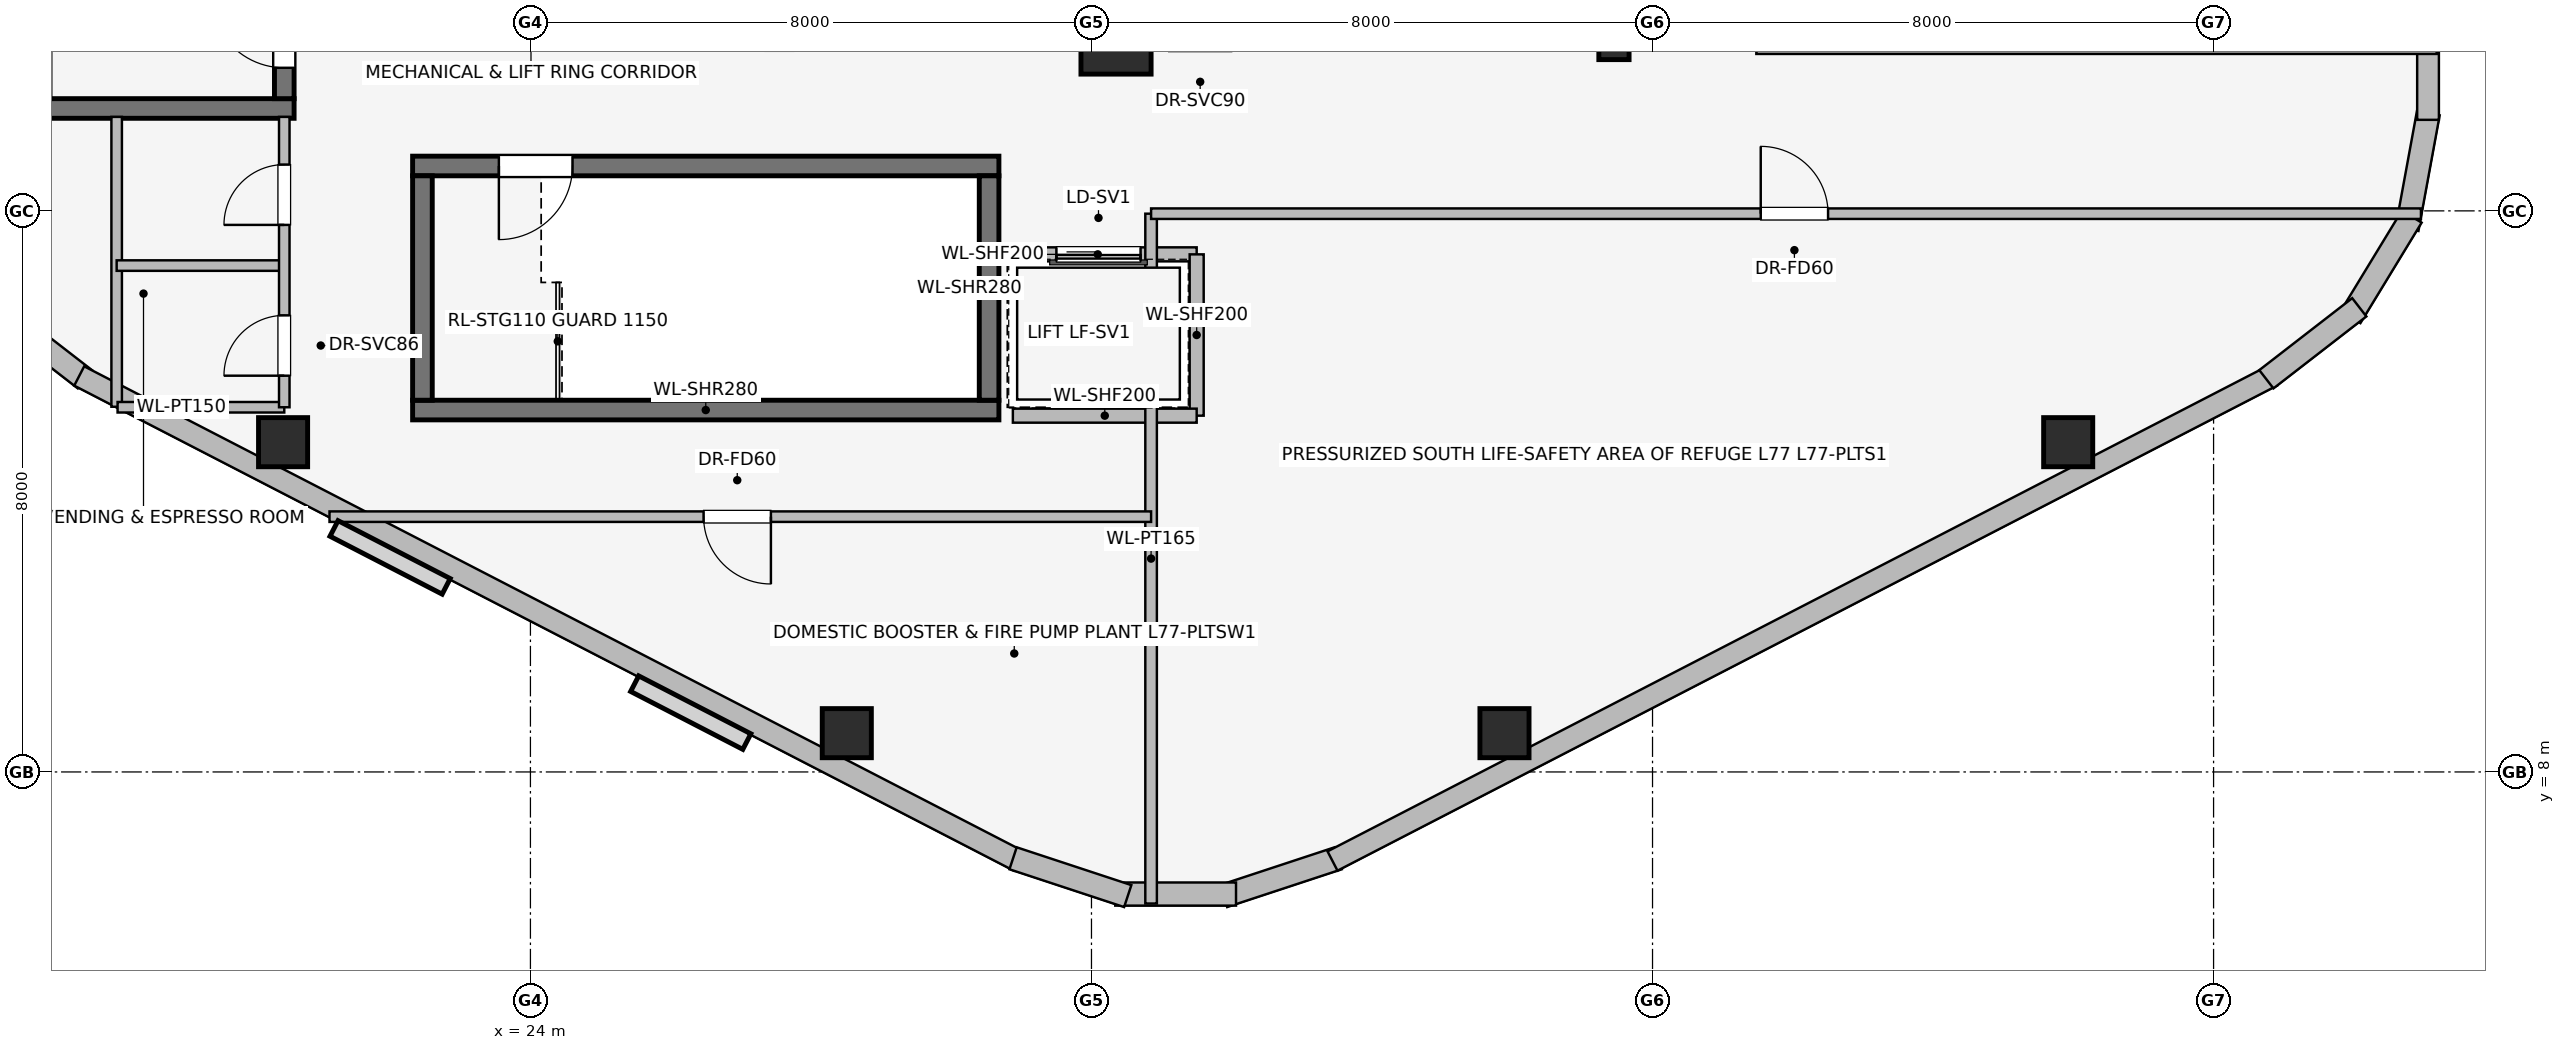
"""IFC4 building model, lengths in metres.
Left out: names, types, materials, properties, quantities, classifications, styles, units other than length and angle.
Written with IfcOpenShell. Run it as: python <this file> out.ifc"""

import sys

from ifc_helpers import new_model, si_unit, direction, frame, frame_2d, origin, origin_2d, place, context, subcontext, project, spatial, rectangle, i_section, extrude, element, fill, save


model = new_model("IFC4")
c1 = context("Model", 3, precision=1e-05, world=origin(), true_north=direction((0.0, 1.0)))
c2 = subcontext(c1, "Body", "Model", "MODEL_VIEW")
j1 = project(units=[si_unit("LENGTHUNIT", "METRE"), si_unit("PLANEANGLEUNIT", "RADIAN")], contexts=[c1])
p1 = place(None, origin())
s1 = spatial("IfcSite", under=j1, at=p1, CompositionType="ELEMENT")
p2 = place(p1, origin())
s2 = spatial("IfcBuilding", under=s1, at=p2, CompositionType="ELEMENT")
p3 = place(p2, frame((0.0, 0.0, 285.1)))
s3 = spatial("IfcBuildingStorey", under=s2, at=p3, CompositionType="ELEMENT", Elevation=285.1)
p4 = place(p3, frame((16.87, 17.46, 0.0), z_axis=(0.0, 0.0, 1.0), x_axis=(1.0, 0.0, 0.0)))
e1 = element("IfcWall", 1, at=p4, inside=s3, PredefinedType="SHEAR", context=c2, shape_type="SweptSolid", body=[
    extrude(rectangle(XDim=3.76, YDim=0.28, at=frame_2d((1.88, 0.0))), origin(), (0.0, 0.0, 1.0), 6.2),
])
p5 = place(p3, frame((20.49, 17.6, 0.0), z_axis=(0.0, 0.0, 1.0), x_axis=(0.0, 1.0, 0.0)))
e2 = element("IfcWall", 2, at=p5, inside=s3, PredefinedType="SHEAR", context=c2, shape_type="SweptSolid", body=[
    extrude(rectangle(XDim=7.8, YDim=0.28, at=frame_2d((3.9, 0.0))), origin(), (0.0, 0.0, 1.0), 6.2),
])
p6 = place(p5, frame((0.44, 0.0, 0.0)))
e3 = element("IfcOpeningElement", 3, at=p6, cuts=e2, PredefinedType="OPENING", context=c2, shape_type="SweptSolid", body=[
    extrude(rectangle(XDim=1.05, YDim=2.0, at=frame_2d((0.525, 1.0))), frame((0.0, 0.15, 0.0), z_axis=(0.0, -1.0, 0.0), x_axis=(1.0, 0.0, 0.0)), (0.0, 0.0, 1.0), 0.3),
])
p7 = place(p3, frame((22.32, 13.16, 0.0), z_axis=(0.0, 0.0, 1.0), x_axis=(1.0, 0.0, 0.0)))
e4 = element("IfcWall", 4, at=p7, inside=s3, PredefinedType="SHEAR", context=c2, shape_type="SweptSolid", body=[
    extrude(rectangle(XDim=8.36, YDim=0.28, at=frame_2d((4.18, 0.0))), origin(), (0.0, 0.0, 1.0), 6.2),
])
p8 = place(p3, frame((30.68, 16.64, 0.0), z_axis=(0.0, 0.0, 1.0), x_axis=(-1.0, 0.0, 0.0)))
e5 = element("IfcWall", 5, at=p8, inside=s3, PredefinedType="SHEAR", context=c2, shape_type="SweptSolid", body=[
    extrude(rectangle(XDim=8.36, YDim=0.28, at=frame_2d((4.18, 0.0))), origin(), (0.0, 0.0, 1.0), 6.2),
])
p9 = place(p8, frame((6.08, 0.0, 0.0)))
e6 = element("IfcOpeningElement", 6, at=p9, cuts=e5, PredefinedType="OPENING", context=c2, shape_type="SweptSolid", body=[
    extrude(rectangle(XDim=1.05, YDim=2.0, at=frame_2d((0.525, 1.0))), frame((0.0, 0.15, 0.0), z_axis=(0.0, -1.0, 0.0), x_axis=(1.0, 0.0, 0.0)), (0.0, 0.0, 1.0), 0.3),
])
for number, where, z_axis, x_axis in (
    (7, (22.46, 16.5, 0.0), (0.0, 0.0, 1.0), (0.0, -1.0, 0.0)),
    (8, (30.54, 13.3, 0.0), (0.0, 0.0, 1.0), (0.0, 1.0, 0.0)),
):
    element("IfcWall", number, at=place(p3, frame(where, z_axis=z_axis, x_axis=x_axis)), inside=s3, PredefinedType="SHEAR", context=c2, shape_type="SweptSolid", body=[
        extrude(rectangle(XDim=3.2, YDim=0.28, at=frame_2d((1.6, 0.0))), origin(), (0.0, 0.0, 1.0), 6.2),
    ])
p10 = place(p3, frame((32.35, 18.45, 0.0), z_axis=(0.0, 0.0, 1.0), x_axis=(1.0, 0.0, 0.0)))
e9 = element("IfcColumn", 9, at=p10, inside=s3, PredefinedType="COLUMN", context=c2, shape_type="SweptSolid", body=[
    extrude(rectangle(XDim=1.0, YDim=1.0, at=origin_2d()), origin(), (0.0, 0.0, 1.0), 6.2),
])
for number, where, z_axis, x_axis in (
    (10, (20.473, 12.702, 0.0), (0.0, 0.0, 1.0), (1.0, 0.0, 0.0)),
    (11, (28.511, 8.553, 0.0), (0.0, 0.0, 1.0), (1.0, 0.0, 0.0)),
    (12, (37.889, 8.553, 0.0), (0.0, 0.0, 1.0), (1.0, 0.0, 0.0)),
    (13, (45.927, 12.702, 0.0), (0.0, 0.0, 1.0), (1.0, 0.0, 0.0)),
):
    element("IfcColumn", number, at=place(p3, frame(where, z_axis=z_axis, x_axis=x_axis)), inside=s3, PredefinedType="COLUMN", context=c2, shape_type="SweptSolid", body=[
        extrude(rectangle(XDim=0.7, YDim=0.7, at=origin_2d()), origin(), (0.0, 0.0, 1.0), 6.2),
    ])
p11 = place(p3, frame((39.45, 18.65, 0.0), z_axis=(0.0, 0.0, 1.0), x_axis=(1.0, 0.0, 0.0)))
e14 = element("IfcColumn", 14, at=p11, inside=s3, PredefinedType="COLUMN", context=c2, shape_type="SweptSolid", body=[
    extrude(i_section(OverallWidth=0.431, OverallDepth=0.987, WebThickness=0.034, FlangeThickness=0.062, at=origin_2d()), origin(), (0.0, 0.0, 1.0), 6.2),
])
p12 = place(p3, frame((17.647, 13.599, 0.0), z_axis=(0.0, 0.0, 1.0), x_axis=(-0.790691856293, 0.61221433207, 0.0)))
e15 = element("IfcWall", 15, at=p12, inside=s3, PredefinedType="STANDARD", context=c2, shape_type="SweptSolid", body=[
    extrude(rectangle(XDim=1.676, YDim=0.33, at=frame_2d((0.838, 0.0))), origin(), (0.0, 0.0, 1.0), 5.88),
])
p13 = place(p3, frame((30.963, 6.73, 0.0), z_axis=(0.0, 0.0, 1.0), x_axis=(-0.888581481622, 0.458718814218, 0.0)))
e16 = element("IfcWall", 16, at=p13, inside=s3, PredefinedType="STANDARD", context=c2, shape_type="SweptSolid", body=[
    extrude(rectangle(XDim=15.077, YDim=0.31, at=frame_2d((7.539, 0.0))), origin(), (0.0, 0.0, 1.0), 5.88),
])
p14 = place(p3, frame((35.518, 6.769, 0.0), z_axis=(0.0, 0.0, 1.0), x_axis=(-0.949713440491, -0.313120393699, 0.0)))
e17 = element("IfcWall", 17, at=p14, inside=s3, PredefinedType="STANDARD", context=c2, shape_type="SweptSolid", body=[
    extrude(rectangle(XDim=1.722, YDim=0.33, at=frame_2d((0.861, 0.0))), origin(), (0.0, 0.0, 1.0), 5.88),
])
p15 = place(p3, frame((34.061, 6.259, 0.0), z_axis=(0.0, 0.0, 1.0), x_axis=(-1.0, 0.0, 0.0)))
e18 = element("IfcWall", 18, at=p15, inside=s3, PredefinedType="STANDARD", context=c2, shape_type="SweptSolid", body=[
    extrude(rectangle(XDim=1.722, YDim=0.33, at=frame_2d((0.861, 0.0))), origin(), (0.0, 0.0, 1.0), 5.88),
])
p16 = place(p3, frame((32.517, 6.23, 0.0), z_axis=(0.0, 0.0, 1.0), x_axis=(-0.949713440491, 0.313120393699, 0.0)))
e19 = element("IfcWall", 19, at=p16, inside=s3, PredefinedType="STANDARD", context=c2, shape_type="SweptSolid", body=[
    extrude(rectangle(XDim=1.722, YDim=0.33, at=frame_2d((0.861, 0.0))), origin(), (0.0, 0.0, 1.0), 5.88),
])
p17 = place(p3, frame((48.834, 13.646, 0.0), z_axis=(0.0, 0.0, 1.0), x_axis=(-0.888581481622, -0.458718814218, 0.0)))
e20 = element("IfcWall", 20, at=p17, inside=s3, PredefinedType="STANDARD", context=c2, shape_type="SweptSolid", body=[
    extrude(rectangle(XDim=15.077, YDim=0.31, at=frame_2d((7.539, 0.0))), origin(), (0.0, 0.0, 1.0), 5.88),
])
p18 = place(p3, frame((51.062, 17.392, 0.0), z_axis=(0.0, 0.0, 1.0), x_axis=(-0.180691763044, -0.983539773862, 0.0)))
e21 = element("IfcWall", 21, at=p18, inside=s3, PredefinedType="STANDARD", context=c2, shape_type="SweptSolid", body=[
    extrude(rectangle(XDim=1.677, YDim=0.33, at=frame_2d((0.838, 0.0))), origin(), (0.0, 0.0, 1.0), 5.88),
])
p19 = place(p3, frame((50.826, 15.918, 0.0), z_axis=(0.0, 0.0, 1.0), x_axis=(-0.520325409202, -0.853968072318, 0.0)))
e22 = element("IfcWall", 22, at=p19, inside=s3, PredefinedType="STANDARD", context=c2, shape_type="SweptSolid", body=[
    extrude(rectangle(XDim=1.678, YDim=0.33, at=frame_2d((0.839, 0.0))), origin(), (0.0, 0.0, 1.0), 5.88),
])
p20 = place(p3, frame((50.078, 14.625, 0.0), z_axis=(0.0, 0.0, 1.0), x_axis=(-0.790691856293, -0.61221433207, 0.0)))
e23 = element("IfcWall", 23, at=p20, inside=s3, PredefinedType="STANDARD", context=c2, shape_type="SweptSolid", body=[
    extrude(rectangle(XDim=1.676, YDim=0.33, at=frame_2d((0.838, 0.0))), origin(), (0.0, 0.0, 1.0), 5.88),
])
p21 = place(p3, frame((51.058, 30.702, 0.0), z_axis=(0.0, 0.0, 1.0), x_axis=(0.0, -1.0, 0.0)))
e24 = element("IfcWall", 24, at=p21, inside=s3, PredefinedType="STANDARD", context=c2, shape_type="SweptSolid", body=[
    extrude(rectangle(XDim=13.404, YDim=0.31, at=frame_2d((6.702, 0.0))), origin(), (0.0, 0.0, 1.0), 5.88),
])
p22 = place(p3, frame((33.5, 15.38, 0.0), z_axis=(0.0, 0.0, 1.0), x_axis=(-1.0, 0.0, 0.0)))
e25 = element("IfcWall", 25, at=p22, inside=s3, PredefinedType="PARTITIONING", context=c2, shape_type="SweptSolid", body=[
    extrude(rectangle(XDim=2.82, YDim=0.2, at=frame_2d((1.41, 0.0))), origin(), (0.0, 0.0, 1.0), 5.88),
])
p23 = place(p22, frame((0.8, 0.0, 0.0)))
e26 = element("IfcOpeningElement", 26, at=p23, cuts=e25, PredefinedType="OPENING", context=c2, shape_type="SweptSolid", body=[
    extrude(rectangle(XDim=1.2, YDim=2.2, at=frame_2d((0.6, 1.1))), frame((0.0, 0.11, 0.0), z_axis=(0.0, -1.0, 0.0), x_axis=(1.0, 0.0, 0.0)), (0.0, 0.0, 1.0), 0.22),
])
p24 = place(p3, frame((33.5, 13.08, 0.0), z_axis=(0.0, 0.0, 1.0), x_axis=(0.0, 1.0, 0.0)))
e27 = element("IfcWall", 27, at=p24, inside=s3, PredefinedType="PARTITIONING", context=c2, shape_type="SweptSolid", body=[
    extrude(rectangle(XDim=2.3, YDim=0.2, at=frame_2d((1.15, 0.0))), origin(), (0.0, 0.0, 1.0), 5.88),
])
p25 = place(p3, frame((30.879, 13.08, 0.0), z_axis=(0.0, 0.0, 1.0), x_axis=(1.0, 0.0, 0.0)))
e28 = element("IfcWall", 28, at=p25, inside=s3, PredefinedType="PARTITIONING", context=c2, shape_type="SweptSolid", body=[
    extrude(rectangle(XDim=2.621, YDim=0.2, at=frame_2d((1.311, 0.0))), origin(), (0.0, 0.0, 1.0), 5.88),
])
p26 = place(p3, frame((18.1, 17.34, 0.0), z_axis=(0.0, 0.0, 1.0), x_axis=(0.0, -1.0, 0.0)))
e29 = element("IfcWall", 29, at=p26, inside=s3, PredefinedType="PARTITIONING", context=c2, shape_type="SweptSolid", body=[
    extrude(rectangle(XDim=4.133, YDim=0.15, at=frame_2d((2.066, 0.0))), origin(), (0.0, 0.0, 1.0), 5.88),
])
p27 = place(p3, frame((18.113, 13.2, 0.0), z_axis=(0.0, 0.0, 1.0), x_axis=(1.0, 0.0, 0.0)))
e30 = element("IfcWall", 30, at=p27, inside=s3, PredefinedType="PARTITIONING", context=c2, shape_type="SweptSolid", body=[
    extrude(rectangle(XDim=2.377, YDim=0.15, at=frame_2d((1.188, 0.0))), origin(), (0.0, 0.0, 1.0), 5.88),
])
p28 = place(p3, frame((18.1, 15.22, 0.0), z_axis=(0.0, 0.0, 1.0), x_axis=(1.0, 0.0, 0.0)))
e31 = element("IfcWall", 31, at=p28, inside=s3, PredefinedType="PARTITIONING", context=c2, shape_type="SweptSolid", body=[
    extrude(rectangle(XDim=2.39, YDim=0.15, at=frame_2d((1.195, 0.0))), origin(), (0.0, 0.0, 1.0), 5.88),
])
p29 = place(p3, frame((20.49, 13.2, 0.0), z_axis=(0.0, 0.0, 1.0), x_axis=(0.0, 1.0, 0.0)))
e32 = element("IfcWall", 32, at=p29, inside=s3, PredefinedType="PARTITIONING", context=c2, shape_type="SweptSolid", body=[
    extrude(rectangle(XDim=4.14, YDim=0.15, at=frame_2d((2.07, 0.0))), origin(), (0.0, 0.0, 1.0), 5.88),
])
p30 = place(p29, frame((0.45, 0.0, 0.0)))
e33 = element("IfcOpeningElement", 33, at=p30, cuts=e32, PredefinedType="OPENING", context=c2, shape_type="SweptSolid", body=[
    extrude(rectangle(XDim=0.86, YDim=2.0, at=frame_2d((0.43, 1.0))), frame((0.0, 0.085, 0.0), z_axis=(0.0, -1.0, 0.0), x_axis=(1.0, 0.0, 0.0)), (0.0, 0.0, 1.0), 0.17),
])
p31 = place(p29, frame((2.6, 0.0, 0.0)))
e34 = element("IfcOpeningElement", 34, at=p31, cuts=e32, PredefinedType="OPENING", context=c2, shape_type="SweptSolid", body=[
    extrude(rectangle(XDim=0.86, YDim=2.0, at=frame_2d((0.43, 1.0))), frame((0.0, 0.085, 0.0), z_axis=(0.0, -1.0, 0.0), x_axis=(1.0, 0.0, 0.0)), (0.0, 0.0, 1.0), 0.17),
])
p32 = place(p3, frame((32.85, 6.124, 0.0), z_axis=(0.0, 0.0, 1.0), x_axis=(0.0, 1.0, 0.0)))
e35 = element("IfcWall", 35, at=p32, inside=s3, PredefinedType="PARTITIONING", context=c2, shape_type="SweptSolid", body=[
    extrude(rectangle(XDim=9.836, YDim=0.165, at=frame_2d((4.918, 0.0))), origin(), (0.0, 0.0, 1.0), 5.88),
])
p33 = place(p3, frame((32.85, 11.64, 0.0), z_axis=(0.0, 0.0, 1.0), x_axis=(-1.0, 0.0, 0.0)))
e36 = element("IfcWall", 36, at=p33, inside=s3, PredefinedType="PARTITIONING", context=c2, shape_type="SweptSolid", body=[
    extrude(rectangle(XDim=11.715, YDim=0.15, at=frame_2d((5.857, 0.0))), origin(), (0.0, 0.0, 1.0), 5.88),
])
p34 = place(p33, frame((5.421, 0.0, 0.0)))
e37 = element("IfcOpeningElement", 37, at=p34, cuts=e36, PredefinedType="OPENING", context=c2, shape_type="SweptSolid", body=[
    extrude(rectangle(XDim=0.96, YDim=2.0, at=frame_2d((0.48, 1.0))), frame((0.0, 0.085, 0.0), z_axis=(0.0, -1.0, 0.0), x_axis=(1.0, 0.0, 0.0)), (0.0, 0.0, 1.0), 0.17),
])
p35 = place(p3, frame((41.48, 18.32, 0.0), z_axis=(0.0, 0.0, 1.0), x_axis=(1.0, 0.0, 0.0)))
e38 = element("IfcWall", 38, at=p35, inside=s3, PredefinedType="PARTITIONING", context=c2, shape_type="SweptSolid", body=[
    extrude(rectangle(XDim=9.703, YDim=0.165, at=frame_2d((4.852, 0.0))), origin(), (0.0, 0.0, 1.0), 5.88),
])
p36 = place(p3, frame((32.85, 15.96, 0.0), z_axis=(0.0, 0.0, 1.0), x_axis=(1.0, 0.0, 0.0)))
e39 = element("IfcWall", 39, at=p36, inside=s3, PredefinedType="PARTITIONING", context=c2, shape_type="SweptSolid", body=[
    extrude(rectangle(XDim=18.107, YDim=0.15, at=frame_2d((9.053, 0.0))), origin(), (0.0, 0.0, 1.0), 5.423),
])
p37 = place(p36, frame((8.693, 0.0, 0.0)))
e40 = element("IfcOpeningElement", 40, at=p37, cuts=e39, PredefinedType="OPENING", context=c2, shape_type="SweptSolid", body=[
    extrude(rectangle(XDim=0.96, YDim=2.0, at=frame_2d((0.48, 1.0))), frame((0.0, 0.085, 0.0), z_axis=(0.0, -1.0, 0.0), x_axis=(1.0, 0.0, 0.0)), (0.0, 0.0, 1.0), 0.17),
])
p38 = place(p6, origin())
e41 = element("IfcDoor", 41, at=p38, inside=s3, OperationType="SINGLE_SWING_RIGHT", PredefinedType="DOOR", context=c2, shape_type="SweptSolid", body=[
    extrude(rectangle(XDim=1.05, YDim=2.0, at=frame_2d((0.525, 1.0))), frame((0.0, 0.025, 0.0), z_axis=(0.0, -1.0, 0.0), x_axis=(1.0, 0.0, 0.0)), (0.0, 0.0, 1.0), 0.05),
])
fill(e3, e41)
p39 = place(p9, origin())
e42 = element("IfcDoor", 42, at=p39, inside=s3, OperationType="SINGLE_SWING_RIGHT", PredefinedType="DOOR", context=c2, shape_type="SweptSolid", body=[
    extrude(rectangle(XDim=1.05, YDim=2.0, at=frame_2d((0.525, 1.0))), frame((0.0, 0.025, 0.0), z_axis=(0.0, -1.0, 0.0), x_axis=(1.0, 0.0, 0.0)), (0.0, 0.0, 1.0), 0.05),
])
fill(e6, e42)
p40 = place(p23, origin())
e43 = element("IfcDoor", 43, at=p40, inside=s3, OperationType="SLIDING_TO_RIGHT", PredefinedType="DOOR", context=c2, shape_type="SweptSolid", body=[
    extrude(rectangle(XDim=1.2, YDim=2.2, at=frame_2d((0.6, 1.1))), frame((0.0, 0.025, 0.0), z_axis=(0.0, -1.0, 0.0), x_axis=(1.0, 0.0, 0.0)), (0.0, 0.0, 1.0), 0.05),
])
fill(e26, e43)
p41 = place(p30, origin())
e44 = element("IfcDoor", 44, at=p41, inside=s3, OperationType="SINGLE_SWING_LEFT", PredefinedType="DOOR", context=c2, shape_type="SweptSolid", body=[
    extrude(rectangle(XDim=0.86, YDim=2.0, at=frame_2d((0.43, 1.0))), frame((0.0, 0.025, 0.0), z_axis=(0.0, -1.0, 0.0), x_axis=(1.0, 0.0, 0.0)), (0.0, 0.0, 1.0), 0.05),
])
fill(e33, e44)
p42 = place(p31, origin())
e45 = element("IfcDoor", 45, at=p42, inside=s3, OperationType="SINGLE_SWING_LEFT", PredefinedType="DOOR", context=c2, shape_type="SweptSolid", body=[
    extrude(rectangle(XDim=0.86, YDim=2.0, at=frame_2d((0.43, 1.0))), frame((0.0, 0.025, 0.0), z_axis=(0.0, -1.0, 0.0), x_axis=(1.0, 0.0, 0.0)), (0.0, 0.0, 1.0), 0.05),
])
fill(e34, e45)
p43 = place(p34, origin())
e46 = element("IfcDoor", 46, at=p43, inside=s3, OperationType="SINGLE_SWING_LEFT", PredefinedType="DOOR", context=c2, shape_type="SweptSolid", body=[
    extrude(rectangle(XDim=0.96, YDim=2.0, at=frame_2d((0.48, 1.0))), frame((0.0, 0.025, 0.0), z_axis=(0.0, -1.0, 0.0), x_axis=(1.0, 0.0, 0.0)), (0.0, 0.0, 1.0), 0.05),
])
fill(e37, e46)
p44 = place(p37, origin())
e47 = element("IfcDoor", 47, at=p44, inside=s3, OperationType="SINGLE_SWING_LEFT", PredefinedType="DOOR", context=c2, shape_type="SweptSolid", body=[
    extrude(rectangle(XDim=0.96, YDim=2.0, at=frame_2d((0.48, 1.0))), frame((0.0, 0.025, 0.0), z_axis=(0.0, -1.0, 0.0), x_axis=(1.0, 0.0, 0.0)), (0.0, 0.0, 1.0), 0.05),
])
fill(e40, e47)
save(model, sys.argv[1])
